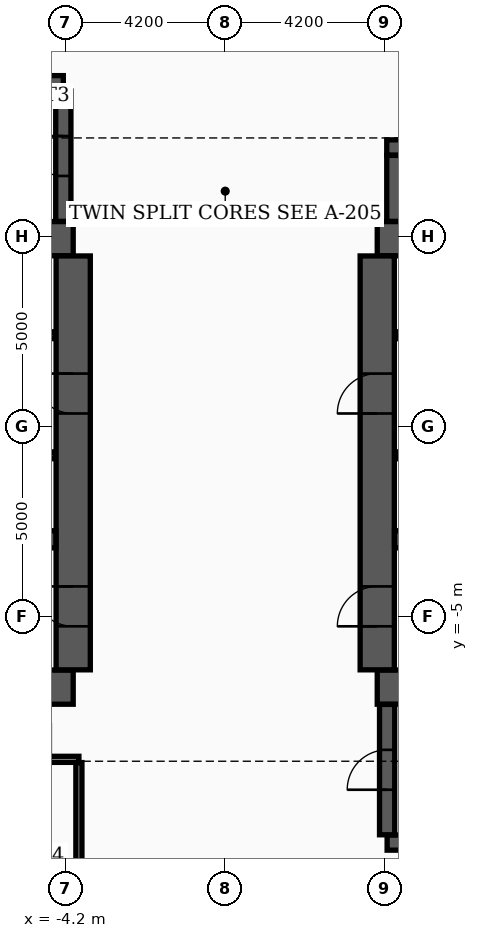
"""IFC4 building model, lengths in metres.
Left out: names, types, materials, properties, quantities, classifications, styles, units other than length and angle.
Written with IfcOpenShell. Run it as: python <this file> out.ifc"""

import sys

from ifc_helpers import new_model, si_unit, direction, frame, frame_2d, origin, place, context, subcontext, project, spatial, rectangle, extrude, element, fill, save


model = new_model("IFC4")
c1 = context("Model", 3, precision=1e-05, world=origin(), true_north=direction((0.0, 1.0)))
c2 = subcontext(c1, "Body", "Model", "MODEL_VIEW")
j1 = project(units=[si_unit("LENGTHUNIT", "METRE"), si_unit("PLANEANGLEUNIT", "RADIAN")], contexts=[c1])
p1 = place(None, origin())
s1 = spatial("IfcSite", under=j1, at=p1, CompositionType="ELEMENT")
p2 = place(p1, origin())
s2 = spatial("IfcBuilding", under=s1, at=p2, CompositionType="ELEMENT")
p3 = place(p2, frame((0.0, 0.0, 87.3)))
s3 = spatial("IfcBuildingStorey", under=s2, at=p3, CompositionType="ELEMENT", Elevation=87.3)
for number, where, z_axis, x_axis in (
    (1, (-12.4, -6.85, 0.0), (0.0, 0.0, 1.0), (1.0, 0.0, 0.0)),
    (2, (-12.4, 4.95, 0.0), (0.0, 0.0, 1.0), (1.0, 0.0, 0.0)),
):
    element("IfcWall", number, at=place(p3, frame(where, z_axis=z_axis, x_axis=x_axis)), inside=s3, PredefinedType="SHEAR", context=c2, shape_type="SweptSolid", body=[
        extrude(rectangle(XDim=8.4, YDim=0.9, at=frame_2d((4.2, 0.0))), origin(), (0.0, 0.0, 1.0), 3.7),
    ])
p4 = place(p3, frame((-4.0, -6.395, 0.0), z_axis=(0.0, 0.0, 1.0), x_axis=(0.0, 1.0, 0.0)))
e3 = element("IfcWall", 3, at=p4, inside=s3, PredefinedType="SHEAR", context=c2, shape_type="SweptSolid", body=[
    extrude(rectangle(XDim=10.89, YDim=0.9, at=frame_2d((5.445, 0.0))), origin(), (0.0, 0.0, 1.0), 3.7),
])
p5 = place(p4, frame((1.145, 0.0, 0.0)))
e4 = element("IfcOpeningElement", 4, at=p5, cuts=e3, PredefinedType="OPENING", context=c2, shape_type="SweptSolid", body=[
    extrude(rectangle(XDim=1.05, YDim=2.15, at=frame_2d((0.525, 1.075))), frame((0.0, 0.46, 0.0), z_axis=(0.0, -1.0, 0.0), x_axis=(1.0, 0.0, 0.0)), (0.0, 0.0, 1.0), 0.92),
])
p6 = place(p4, frame((6.745, 0.0, 0.0)))
e5 = element("IfcOpeningElement", 5, at=p6, cuts=e3, PredefinedType="OPENING", context=c2, shape_type="SweptSolid", body=[
    extrude(rectangle(XDim=1.05, YDim=2.15, at=frame_2d((0.525, 1.075))), frame((0.0, 0.46, 0.0), z_axis=(0.0, -1.0, 0.0), x_axis=(1.0, 0.0, 0.0)), (0.0, 0.0, 1.0), 0.92),
])
p7 = place(p3, frame((-11.945, -2.96, 0.0), z_axis=(0.0, 0.0, 1.0), x_axis=(1.0, 0.0, 0.0)))
e6 = element("IfcWall", 6, at=p7, inside=s3, PredefinedType="SHEAR", context=c2, shape_type="SweptSolid", body=[
    extrude(rectangle(XDim=7.49, YDim=0.45, at=frame_2d((3.745, 0.0))), origin(), (0.0, 0.0, 1.0), 3.7),
])
for number, where, z_axis, x_axis in (
    (7, (4.0, -6.85, 0.0), (0.0, 0.0, 1.0), (1.0, 0.0, 0.0)),
    (8, (4.0, 4.95, 0.0), (0.0, 0.0, 1.0), (1.0, 0.0, 0.0)),
):
    element("IfcWall", number, at=place(p3, frame(where, z_axis=z_axis, x_axis=x_axis)), inside=s3, PredefinedType="SHEAR", context=c2, shape_type="SweptSolid", body=[
        extrude(rectangle(XDim=8.4, YDim=0.9, at=frame_2d((4.2, 0.0))), origin(), (0.0, 0.0, 1.0), 3.7),
    ])
p8 = place(p3, frame((4.0, -6.395, 0.0), z_axis=(0.0, 0.0, 1.0), x_axis=(0.0, 1.0, 0.0)))
e9 = element("IfcWall", 9, at=p8, inside=s3, PredefinedType="SHEAR", context=c2, shape_type="SweptSolid", body=[
    extrude(rectangle(XDim=10.89, YDim=0.9, at=frame_2d((5.445, 0.0))), origin(), (0.0, 0.0, 1.0), 3.7),
])
p9 = place(p8, frame((1.145, 0.0, 0.0)))
e10 = element("IfcOpeningElement", 10, at=p9, cuts=e9, PredefinedType="OPENING", context=c2, shape_type="SweptSolid", body=[
    extrude(rectangle(XDim=1.05, YDim=2.15, at=frame_2d((0.525, 1.075))), frame((0.0, 0.46, 0.0), z_axis=(0.0, -1.0, 0.0), x_axis=(1.0, 0.0, 0.0)), (0.0, 0.0, 1.0), 0.92),
])
p10 = place(p8, frame((6.745, 0.0, 0.0)))
e11 = element("IfcOpeningElement", 11, at=p10, cuts=e9, PredefinedType="OPENING", context=c2, shape_type="SweptSolid", body=[
    extrude(rectangle(XDim=1.05, YDim=2.15, at=frame_2d((0.525, 1.075))), frame((0.0, 0.46, 0.0), z_axis=(0.0, -1.0, 0.0), x_axis=(1.0, 0.0, 0.0)), (0.0, 0.0, 1.0), 0.92),
])
p11 = place(p3, frame((4.455, -2.96, 0.0), z_axis=(0.0, 0.0, 1.0), x_axis=(1.0, 0.0, 0.0)))
e12 = element("IfcWall", 12, at=p11, inside=s3, PredefinedType="SHEAR", context=c2, shape_type="SweptSolid", body=[
    extrude(rectangle(XDim=7.49, YDim=0.45, at=frame_2d((3.745, 0.0))), origin(), (0.0, 0.0, 1.0), 3.7),
])
p12 = place(p3, frame((-12.22, 9.04, 0.0), z_axis=(0.0, 0.0, 1.0), x_axis=(1.0, 0.0, 0.0)))
e13 = element("IfcWall", 13, at=p12, inside=s3, PredefinedType="SHEAR", context=c2, shape_type="SweptSolid", body=[
    extrude(rectangle(XDim=7.96, YDim=0.4, at=frame_2d((3.98, 0.0))), origin(), (0.0, 0.0, 1.0), 3.7),
])
p13 = place(p3, frame((-4.26, 5.405, 0.0), z_axis=(0.0, 0.0, 1.0), x_axis=(0.0, 1.0, 0.0)))
e14 = element("IfcWall", 14, at=p13, inside=s3, PredefinedType="SHEAR", context=c2, shape_type="SweptSolid", body=[
    extrude(rectangle(XDim=3.43, YDim=0.4, at=frame_2d((1.715, 0.0))), origin(), (0.0, 0.0, 1.0), 3.7),
])
p14 = place(p13, frame((1.195, 0.0, 0.0)))
e15 = element("IfcOpeningElement", 15, at=p14, cuts=e14, PredefinedType="OPENING", context=c2, shape_type="SweptSolid", body=[
    extrude(rectangle(XDim=1.05, YDim=2.15, at=frame_2d((0.525, 1.075))), frame((0.0, 0.21, 0.0), z_axis=(0.0, -1.0, 0.0), x_axis=(1.0, 0.0, 0.0)), (0.0, 0.0, 1.0), 0.42),
])
p15 = place(p3, frame((4.26, -10.94, 0.0), z_axis=(0.0, 0.0, 1.0), x_axis=(1.0, 0.0, 0.0)))
e16 = element("IfcWall", 16, at=p15, inside=s3, PredefinedType="SHEAR", context=c2, shape_type="SweptSolid", body=[
    extrude(rectangle(XDim=7.96, YDim=0.4, at=frame_2d((3.98, 0.0))), origin(), (0.0, 0.0, 1.0), 3.7),
])
p16 = place(p3, frame((4.26, -10.735, 0.0), z_axis=(0.0, 0.0, 1.0), x_axis=(0.0, 1.0, 0.0)))
e17 = element("IfcWall", 17, at=p16, inside=s3, PredefinedType="SHEAR", context=c2, shape_type="SweptSolid", body=[
    extrude(rectangle(XDim=3.43, YDim=0.4, at=frame_2d((1.715, 0.0))), origin(), (0.0, 0.0, 1.0), 3.7),
])
p17 = place(p16, frame((1.185, 0.0, 0.0)))
e18 = element("IfcOpeningElement", 18, at=p17, cuts=e17, PredefinedType="OPENING", context=c2, shape_type="SweptSolid", body=[
    extrude(rectangle(XDim=1.05, YDim=2.15, at=frame_2d((0.525, 1.075))), frame((0.0, 0.21, 0.0), z_axis=(0.0, -1.0, 0.0), x_axis=(1.0, 0.0, 0.0)), (0.0, 0.0, 1.0), 0.42),
])
p18 = place(p3, frame((4.45, 5.405, 0.0), z_axis=(0.0, 0.0, 1.0), x_axis=(0.0, 1.0, 0.0)))
e19 = element("IfcWall", 19, at=p18, inside=s3, PredefinedType="SHEAR", context=c2, shape_type="SweptSolid", body=[
    extrude(rectangle(XDim=1.735, YDim=0.4, at=frame_2d((0.867, 0.0))), origin(), (0.0, 0.0, 1.0), 3.7),
])
p19 = place(p3, frame((4.25, 7.35, 0.0), z_axis=(0.0, 0.0, 1.0), x_axis=(1.0, 0.0, 0.0)))
e20 = element("IfcWall", 20, at=p19, inside=s3, PredefinedType="SHEAR", context=c2, shape_type="SweptSolid", body=[
    extrude(rectangle(XDim=5.4, YDim=0.4, at=frame_2d((2.7, 0.0))), origin(), (0.0, 0.0, 1.0), 3.7),
])
p20 = place(p3, frame((-11.9, 2.41, 0.0), z_axis=(0.0, 0.0, 1.0), x_axis=(1.0, 0.0, 0.0)))
e21 = element("IfcWall", 21, at=p20, inside=s3, PredefinedType="SOLIDWALL", context=c2, shape_type="SweptSolid", body=[
    extrude(rectangle(XDim=7.42, YDim=0.18, at=frame_2d((3.71, 0.0))), origin(), (0.0, 0.0, 1.0), 2.9),
])
p21 = place(p20, frame((0.55, 0.0, 0.0)))
e22 = element("IfcOpeningElement", 22, at=p21, cuts=e21, PredefinedType="OPENING", context=c2, shape_type="SweptSolid", body=[
    extrude(rectangle(XDim=1.1, YDim=2.15, at=frame_2d((0.55, 1.075))), frame((0.0, 0.1, 0.0), z_axis=(0.0, -1.0, 0.0), x_axis=(1.0, 0.0, 0.0)), (0.0, 0.0, 1.0), 0.2),
])
p22 = place(p20, frame((3.85, 0.0, 0.0)))
e23 = element("IfcOpeningElement", 23, at=p22, cuts=e21, PredefinedType="OPENING", context=c2, shape_type="SweptSolid", body=[
    extrude(rectangle(XDim=1.1, YDim=2.15, at=frame_2d((0.55, 1.075))), frame((0.0, 0.1, 0.0), z_axis=(0.0, -1.0, 0.0), x_axis=(1.0, 0.0, 0.0)), (0.0, 0.0, 1.0), 0.2),
])
p23 = place(p20, frame((5.75, 0.0, 0.0)))
e24 = element("IfcOpeningElement", 24, at=p23, cuts=e21, PredefinedType="OPENING", context=c2, shape_type="SweptSolid", body=[
    extrude(rectangle(XDim=1.1, YDim=2.15, at=frame_2d((0.55, 1.075))), frame((0.0, 0.1, 0.0), z_axis=(0.0, -1.0, 0.0), x_axis=(1.0, 0.0, 0.0)), (0.0, 0.0, 1.0), 0.2),
])
p24 = place(p3, frame((4.48, 2.41, 0.0), z_axis=(0.0, 0.0, 1.0), x_axis=(1.0, 0.0, 0.0)))
e25 = element("IfcWall", 25, at=p24, inside=s3, PredefinedType="SOLIDWALL", context=c2, shape_type="SweptSolid", body=[
    extrude(rectangle(XDim=7.42, YDim=0.18, at=frame_2d((3.71, 0.0))), origin(), (0.0, 0.0, 1.0), 2.9),
])
p25 = place(p24, frame((5.67, 0.0, 0.0)))
e26 = element("IfcOpeningElement", 26, at=p25, cuts=e25, PredefinedType="OPENING", context=c2, shape_type="SweptSolid", body=[
    extrude(rectangle(XDim=1.1, YDim=2.15, at=frame_2d((0.55, 1.075))), frame((0.0, 0.1, 0.0), z_axis=(0.0, -1.0, 0.0), x_axis=(1.0, 0.0, 0.0)), (0.0, 0.0, 1.0), 0.2),
])
p26 = place(p24, frame((0.52, 0.0, 0.0)))
e27 = element("IfcOpeningElement", 27, at=p26, cuts=e25, PredefinedType="OPENING", context=c2, shape_type="SweptSolid", body=[
    extrude(rectangle(XDim=1.1, YDim=2.15, at=frame_2d((0.55, 1.075))), frame((0.0, 0.1, 0.0), z_axis=(0.0, -1.0, 0.0), x_axis=(1.0, 0.0, 0.0)), (0.0, 0.0, 1.0), 0.2),
])
p27 = place(p24, frame((2.42, 0.0, 0.0)))
e28 = element("IfcOpeningElement", 28, at=p27, cuts=e25, PredefinedType="OPENING", context=c2, shape_type="SweptSolid", body=[
    extrude(rectangle(XDim=1.1, YDim=2.15, at=frame_2d((0.55, 1.075))), frame((0.0, 0.1, 0.0), z_axis=(0.0, -1.0, 0.0), x_axis=(1.0, 0.0, 0.0)), (0.0, 0.0, 1.0), 0.2),
])
for number, where, z_axis, x_axis in (
    (29, (-11.9, -0.75, 0.0), (0.0, 0.0, 1.0), (1.0, 0.0, 0.0)),
    (30, (4.48, -0.75, 0.0), (0.0, 0.0, 1.0), (1.0, 0.0, 0.0)),
):
    element("IfcWall", number, at=place(p3, frame(where, z_axis=z_axis, x_axis=x_axis)), inside=s3, PredefinedType="SOLIDWALL", context=c2, shape_type="SweptSolid", body=[
        extrude(rectangle(XDim=7.42, YDim=0.18, at=frame_2d((3.71, 0.0))), origin(), (0.0, 0.0, 1.0), 2.9),
    ])
p28 = place(p3, frame((-6.29, -8.75, 0.0), z_axis=(0.0, 0.0, 1.0), x_axis=(1.0, 0.0, 0.0)))
e31 = element("IfcWall", 31, at=p28, inside=s3, PredefinedType="PARTITIONING", context=c2, shape_type="SweptSolid", body=[
    extrude(rectangle(XDim=2.44, YDim=0.16, at=frame_2d((1.22, 0.0))), origin(), (0.0, 0.0, 1.0), 2.9),
])
p29 = place(p28, frame((0.74, 0.0, 0.0)))
e32 = element("IfcOpeningElement", 32, at=p29, cuts=e31, PredefinedType="OPENING", context=c2, shape_type="SweptSolid", body=[
    extrude(rectangle(XDim=0.96, YDim=2.15, at=frame_2d((0.48, 1.075))), frame((0.0, 0.09, 0.0), z_axis=(0.0, -1.0, 0.0), x_axis=(1.0, 0.0, 0.0)), (0.0, 0.0, 1.0), 0.18),
])
p30 = place(p3, frame((-3.85, -13.065, 0.0), z_axis=(0.0, 0.0, 1.0), x_axis=(0.0, 1.0, 0.0)))
e33 = element("IfcWall", 33, at=p30, inside=s3, PredefinedType="PARTITIONING", context=c2, shape_type="SweptSolid", body=[
    extrude(rectangle(XDim=4.23, YDim=0.16, at=frame_2d((2.115, 0.0))), origin(), (0.0, 0.0, 1.0), 2.9),
])
p31 = place(p5, origin())
e34 = element("IfcDoor", 34, at=p31, inside=s3, OperationType="SINGLE_SWING_RIGHT", PredefinedType="DOOR", context=c2, shape_type="SweptSolid", body=[
    extrude(rectangle(XDim=1.05, YDim=2.15, at=frame_2d((0.525, 1.075))), frame((0.0, 0.025, 0.0), z_axis=(0.0, -1.0, 0.0), x_axis=(1.0, 0.0, 0.0)), (0.0, 0.0, 1.0), 0.05),
])
fill(e4, e34)
p32 = place(p9, origin())
e35 = element("IfcDoor", 35, at=p32, inside=s3, OperationType="SINGLE_SWING_LEFT", PredefinedType="DOOR", context=c2, shape_type="SweptSolid", body=[
    extrude(rectangle(XDim=1.05, YDim=2.15, at=frame_2d((0.525, 1.075))), frame((0.0, 0.025, 0.0), z_axis=(0.0, -1.0, 0.0), x_axis=(1.0, 0.0, 0.0)), (0.0, 0.0, 1.0), 0.05),
])
fill(e10, e35)
p33 = place(p6, origin())
e36 = element("IfcDoor", 36, at=p33, inside=s3, OperationType="SINGLE_SWING_RIGHT", PredefinedType="DOOR", context=c2, shape_type="SweptSolid", body=[
    extrude(rectangle(XDim=1.05, YDim=2.15, at=frame_2d((0.525, 1.075))), frame((0.0, 0.025, 0.0), z_axis=(0.0, -1.0, 0.0), x_axis=(1.0, 0.0, 0.0)), (0.0, 0.0, 1.0), 0.05),
])
fill(e5, e36)
p34 = place(p10, origin())
e37 = element("IfcDoor", 37, at=p34, inside=s3, OperationType="SINGLE_SWING_LEFT", PredefinedType="DOOR", context=c2, shape_type="SweptSolid", body=[
    extrude(rectangle(XDim=1.05, YDim=2.15, at=frame_2d((0.525, 1.075))), frame((0.0, 0.025, 0.0), z_axis=(0.0, -1.0, 0.0), x_axis=(1.0, 0.0, 0.0)), (0.0, 0.0, 1.0), 0.05),
])
fill(e11, e37)
p35 = place(p14, origin())
e38 = element("IfcDoor", 38, at=p35, inside=s3, OperationType="SINGLE_SWING_RIGHT", PredefinedType="DOOR", context=c2, shape_type="SweptSolid", body=[
    extrude(rectangle(XDim=1.05, YDim=2.15, at=frame_2d((0.525, 1.075))), frame((0.0, 0.025, 0.0), z_axis=(0.0, -1.0, 0.0), x_axis=(1.0, 0.0, 0.0)), (0.0, 0.0, 1.0), 0.05),
])
fill(e15, e38)
p36 = place(p17, origin())
e39 = element("IfcDoor", 39, at=p36, inside=s3, OperationType="SINGLE_SWING_LEFT", PredefinedType="DOOR", context=c2, shape_type="SweptSolid", body=[
    extrude(rectangle(XDim=1.05, YDim=2.15, at=frame_2d((0.525, 1.075))), frame((0.0, 0.025, 0.0), z_axis=(0.0, -1.0, 0.0), x_axis=(1.0, 0.0, 0.0)), (0.0, 0.0, 1.0), 0.05),
])
fill(e18, e39)
save(model, sys.argv[1])
